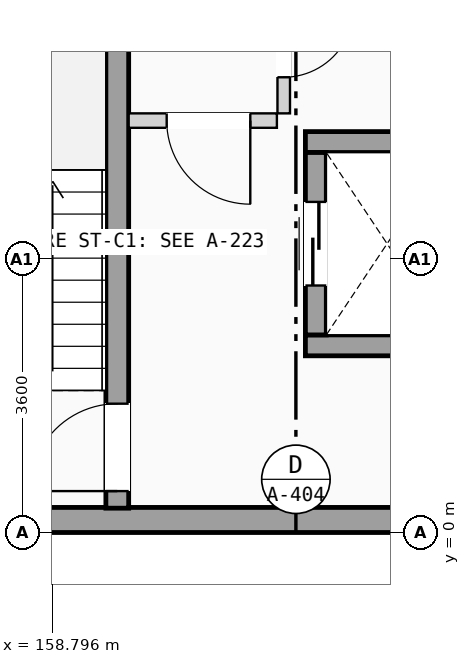
"""IFC4 building model, lengths in metres.
Left out: names, types, materials, properties, quantities, classifications, styles, units other than length and angle.
Written with IfcOpenShell. Run it as: python <this file> out.ifc"""

import sys

from ifc_helpers import new_model, si_unit, direction, frame, frame_2d, origin, place, context, subcontext, project, spatial, rectangle, extrude, element, fill, save


model = new_model("IFC4")
c1 = context("Model", 3, precision=1e-05, world=origin(), true_north=direction((0.0, 1.0)))
c2 = subcontext(c1, "Body", "Model", "MODEL_VIEW")
j1 = project(units=[si_unit("LENGTHUNIT", "METRE"), si_unit("PLANEANGLEUNIT", "RADIAN")], contexts=[c1])
p1 = place(None, origin())
s1 = spatial("IfcSite", under=j1, at=p1, CompositionType="ELEMENT")
p2 = place(p1, origin())
s2 = spatial("IfcBuilding", under=s1, at=p2, CompositionType="ELEMENT")
p3 = place(p2, frame((0.0, 0.0, 4.9)))
s3 = spatial("IfcBuildingStorey", under=s2, at=p3, CompositionType="ELEMENT", Elevation=4.9)
p4 = place(p3, frame((147.6, 0.165, 0.0), z_axis=(0.0, 0.0, 1.0), x_axis=(1.0, 0.0, 0.0)))
e1 = element("IfcWall", 1, at=p4, inside=s3, PredefinedType="SOLIDWALL", context=c2, shape_type="SweptSolid", body=[
    extrude(rectangle(XDim=25.2, YDim=0.33, at=frame_2d((12.6, 0.0))), origin(), (0.0, 0.0, 1.0), 3.415),
])
p5 = place(p3, frame((159.65, 0.32, 0.0), z_axis=(0.0, 0.0, 1.0), x_axis=(0.0, 1.0, 0.0)))
e2 = element("IfcWall", 2, at=p5, inside=s3, PredefinedType="SHEAR", context=c2, shape_type="SweptSolid", body=[
    extrude(rectangle(XDim=7.0, YDim=0.3, at=frame_2d((3.5, 0.0))), origin(), (0.0, 0.0, 1.0), 3.415),
])
p6 = place(p5, frame((0.225, 0.0, 0.0)))
e3 = element("IfcOpeningElement", 3, at=p6, cuts=e2, PredefinedType="OPENING", context=c2, shape_type="SweptSolid", body=[
    extrude(rectangle(XDim=1.15, YDim=2.12, at=frame_2d((0.575, 1.06))), frame((0.0, 0.16, 0.0), z_axis=(0.0, -1.0, 0.0), x_axis=(1.0, 0.0, 0.0)), (0.0, 0.0, 1.0), 0.32),
])
for number, where, z_axis, x_axis in (
    (4, (162.125, 2.462, 0.0), (0.0, 0.0, 1.0), (1.0, 0.0, 0.0)),
    (5, (162.125, 5.137, 0.0), (0.0, 0.0, 1.0), (1.0, 0.0, 0.0)),
):
    element("IfcWall", number, at=place(p3, frame(where, z_axis=z_axis, x_axis=x_axis)), inside=s3, PredefinedType="SHEAR", context=c2, shape_type="SweptSolid", body=[
        extrude(rectangle(XDim=2.15, YDim=0.275, at=frame_2d((1.075, 0.0))), origin(), (0.0, 0.0, 1.0), 3.415),
    ])
p7 = place(p3, frame((162.262, 2.6, 0.0), z_axis=(0.0, 0.0, 1.0), x_axis=(0.0, 1.0, 0.0)))
e6 = element("IfcWall", 6, at=p7, inside=s3, PredefinedType="SHEAR", context=c2, shape_type="SweptSolid", body=[
    extrude(rectangle(XDim=2.4, YDim=0.275, at=frame_2d((1.2, 0.0))), origin(), (0.0, 0.0, 1.0), 3.415),
])
p8 = place(p7, frame((0.65, 0.0, 0.0)))
e7 = element("IfcOpeningElement", 7, at=p8, cuts=e6, PredefinedType="OPENING", context=c2, shape_type="SweptSolid", body=[
    extrude(rectangle(XDim=1.1, YDim=2.15, at=frame_2d((0.55, 1.075))), frame((0.0, 0.147, 0.0), z_axis=(0.0, -1.0, 0.0), x_axis=(1.0, 0.0, 0.0)), (0.0, 0.0, 1.0), 0.295),
])
p9 = place(p3, frame((159.8, 5.42, 0.0), z_axis=(0.0, 0.0, 1.0), x_axis=(1.0, 0.0, 0.0)))
e8 = element("IfcWall", 8, at=p9, inside=s3, PredefinedType="PARTITIONING", context=c2, shape_type="SweptSolid", body=[
    extrude(rectangle(XDim=1.95, YDim=0.19, at=frame_2d((0.975, 0.0))), origin(), (0.0, 0.0, 1.0), 3.395),
])
p10 = place(p9, frame((0.5, 0.0, 0.0)))
e9 = element("IfcOpeningElement", 9, at=p10, cuts=e8, PredefinedType="OPENING", context=c2, shape_type="SweptSolid", body=[
    extrude(rectangle(XDim=1.1, YDim=2.12, at=frame_2d((0.55, 1.06))), frame((0.0, 0.105, 0.0), z_axis=(0.0, -1.0, 0.0), x_axis=(1.0, 0.0, 0.0)), (0.0, 0.0, 1.0), 0.21),
])
p11 = place(p3, frame((161.84, 5.515, 0.0), z_axis=(0.0, 0.0, 1.0), x_axis=(0.0, 1.0, 0.0)))
e10 = element("IfcWall", 10, at=p11, inside=s3, PredefinedType="PARTITIONING", context=c2, shape_type="SweptSolid", body=[
    extrude(rectangle(XDim=1.835, YDim=0.165, at=frame_2d((0.917, 0.0))), origin(), (0.0, 0.0, 1.0), 3.395),
])
p12 = place(p11, frame((0.475, 0.0, 0.0)))
e11 = element("IfcOpeningElement", 11, at=p12, cuts=e10, PredefinedType="OPENING", context=c2, shape_type="SweptSolid", body=[
    extrude(rectangle(XDim=0.92, YDim=2.04, at=frame_2d((0.46, 1.02))), frame((0.0, 0.093, 0.0), z_axis=(0.0, -1.0, 0.0), x_axis=(1.0, 0.0, 0.0)), (0.0, 0.0, 1.0), 0.185),
])
p13 = place(p6, origin())
e12 = element("IfcDoor", 12, at=p13, inside=s3, OperationType="SINGLE_SWING_LEFT", PredefinedType="DOOR", context=c2, shape_type="SweptSolid", body=[
    extrude(rectangle(XDim=1.15, YDim=2.12, at=frame_2d((0.575, 1.06))), frame((0.0, 0.025, 0.0), z_axis=(0.0, -1.0, 0.0), x_axis=(1.0, 0.0, 0.0)), (0.0, 0.0, 1.0), 0.05),
])
fill(e3, e12)
p14 = place(p8, origin())
e13 = element("IfcDoor", 13, at=p14, inside=s3, OperationType="SLIDING_TO_LEFT", PredefinedType="DOOR", context=c2, shape_type="SweptSolid", body=[
    extrude(rectangle(XDim=1.1, YDim=2.15, at=frame_2d((0.55, 1.075))), frame((0.0, 0.025, 0.0), z_axis=(0.0, -1.0, 0.0), x_axis=(1.0, 0.0, 0.0)), (0.0, 0.0, 1.0), 0.05),
])
fill(e7, e13)
p15 = place(p10, frame((1.1, 0.0, 0.0), z_axis=(0.0, 0.0, 1.0), x_axis=(-1.0, 0.0, 0.0)))
e14 = element("IfcDoor", 14, at=p15, inside=s3, OperationType="SINGLE_SWING_RIGHT", PredefinedType="DOOR", context=c2, shape_type="SweptSolid", body=[
    extrude(rectangle(XDim=1.1, YDim=2.12, at=frame_2d((0.55, 1.06))), frame((0.0, 0.025, 0.0), z_axis=(0.0, -1.0, 0.0), x_axis=(1.0, 0.0, 0.0)), (0.0, 0.0, 1.0), 0.05),
])
fill(e9, e14)
p16 = place(p12, frame((0.92, 0.0, 0.0), z_axis=(0.0, 0.0, 1.0), x_axis=(-1.0, 0.0, 0.0)))
e15 = element("IfcDoor", 15, at=p16, inside=s3, OperationType="SINGLE_SWING_RIGHT", PredefinedType="DOOR", context=c2, shape_type="SweptSolid", body=[
    extrude(rectangle(XDim=0.92, YDim=2.04, at=frame_2d((0.46, 1.02))), frame((0.0, 0.025, 0.0), z_axis=(0.0, -1.0, 0.0), x_axis=(1.0, 0.0, 0.0)), (0.0, 0.0, 1.0), 0.05),
])
fill(e11, e15)
save(model, sys.argv[1])
